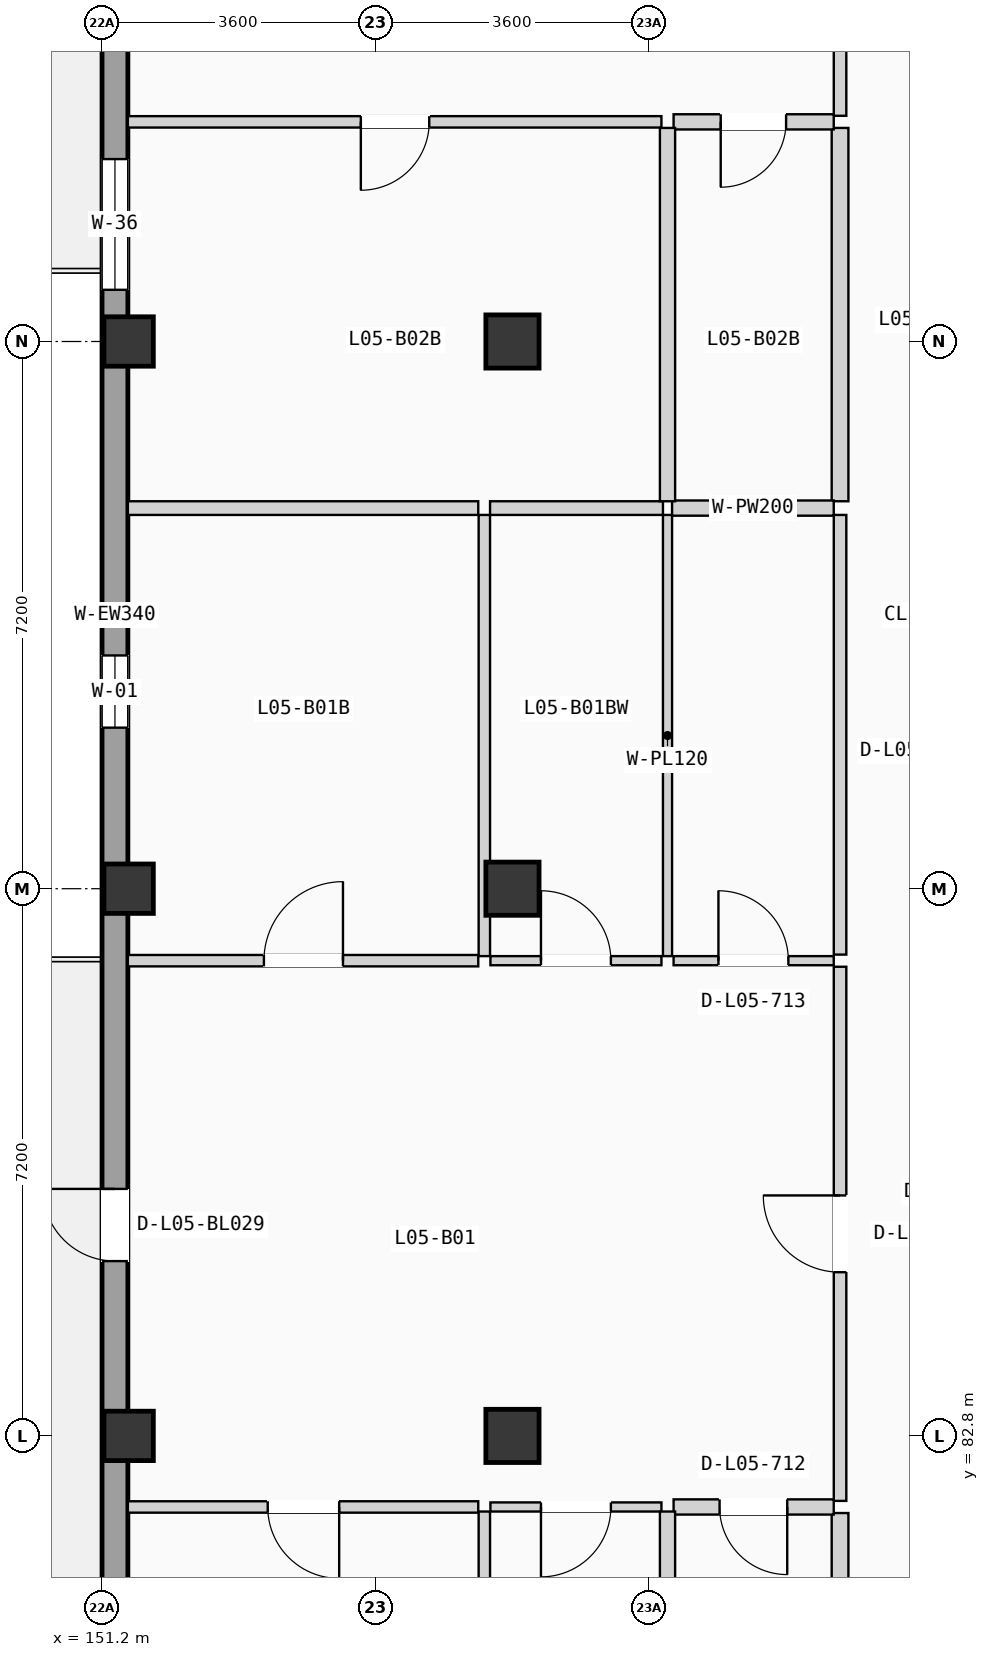
"""IFC4 building model, lengths in metres.
Left out: names, types, materials, properties, quantities, classifications, styles, units other than length and angle.
Written with IfcOpenShell. Run it as: python <this file> out.ifc"""

import sys

from ifc_helpers import new_model, si_unit, direction, frame, frame_2d, origin, origin_2d, place, context, subcontext, project, spatial, rectangle, extrude, element, fill, save


model = new_model("IFC4")
c1 = context("Model", 3, precision=1e-05, world=origin(), true_north=direction((0.0, 1.0)))
c2 = subcontext(c1, "Body", "Model", "MODEL_VIEW")
j1 = project(units=[si_unit("LENGTHUNIT", "METRE"), si_unit("PLANEANGLEUNIT", "RADIAN")], contexts=[c1])
p1 = place(None, origin())
s1 = spatial("IfcSite", under=j1, at=p1, CompositionType="ELEMENT")
p2 = place(p1, origin())
s2 = spatial("IfcBuilding", under=s1, at=p2, CompositionType="ELEMENT")
p3 = place(p2, frame((0.0, 0.0, 18.375)))
s3 = spatial("IfcBuildingStorey", under=s2, at=p3, CompositionType="ELEMENT", Elevation=18.375)
for number, where, z_axis, x_axis in (
    (1, (151.55, 82.8, 0.0), (0.0, 0.0, 1.0), (1.0, 0.0, 0.0)),
    (2, (151.55, 90.0, 0.0), (0.0, 0.0, 1.0), (1.0, 0.0, 0.0)),
    (3, (151.55, 97.2, 0.0), (0.0, 0.0, 1.0), (1.0, 0.0, 0.0)),
):
    element("IfcColumn", number, at=place(p3, frame(where, z_axis=z_axis, x_axis=x_axis)), inside=s3, PredefinedType="COLUMN", context=c2, shape_type="SweptSolid", body=[
        extrude(rectangle(XDim=0.65, YDim=0.65, at=origin_2d()), origin(), (0.0, 0.0, 1.0), 3.15),
    ])
for number, where, z_axis, x_axis in (
    (4, (156.6, 82.8, 0.0), (0.0, 0.0, 1.0), (1.0, 0.0, 0.0)),
    (5, (156.6, 90.0, 0.0), (0.0, 0.0, 1.0), (1.0, 0.0, 0.0)),
    (6, (156.6, 97.2, 0.0), (0.0, 0.0, 1.0), (1.0, 0.0, 0.0)),
):
    element("IfcColumn", number, at=place(p3, frame(where, z_axis=z_axis, x_axis=x_axis)), inside=s3, PredefinedType="COLUMN", context=c2, shape_type="SweptSolid", body=[
        extrude(rectangle(XDim=0.7, YDim=0.7, at=origin_2d()), origin(), (0.0, 0.0, 1.0), 3.15),
    ])
p4 = place(p3, frame((151.37, 68.74, 0.0), z_axis=(0.0, 0.0, 1.0), x_axis=(0.0, 1.0, 0.0)))
e7 = element("IfcWall", 7, at=p4, inside=s3, PredefinedType="SOLIDWALL", context=c2, shape_type="SweptSolid", body=[
    extrude(rectangle(XDim=49.72, YDim=0.34, at=frame_2d((24.86, 0.0))), origin(), (0.0, 0.0, 1.0), 2.89),
])
p5 = place(p4, frame((16.36, 0.0, 0.0)))
e8 = element("IfcOpeningElement", 8, at=p5, cuts=e7, PredefinedType="OPENING", context=c2, shape_type="SweptSolid", body=[
    extrude(rectangle(XDim=0.95, YDim=2.15, at=frame_2d((0.475, 1.075))), frame((0.0, 0.18, 0.0), z_axis=(0.0, -1.0, 0.0), x_axis=(1.0, 0.0, 0.0)), (0.0, 0.0, 1.0), 0.36),
])
p6 = place(p4, frame((9.353, 0.0, 0.555)))
e9 = element("IfcOpeningElement", 9, at=p6, cuts=e7, PredefinedType="OPENING", context=c2, shape_type="SweptSolid", body=[
    extrude(rectangle(XDim=1.6, YDim=1.65, at=frame_2d((0.8, 0.825))), frame((0.0, 0.18, 0.0), z_axis=(0.0, -1.0, 0.0), x_axis=(1.0, 0.0, 0.0)), (0.0, 0.0, 1.0), 0.36),
])
p7 = place(p4, frame((23.379, 0.0, 0.85)))
e10 = element("IfcOpeningElement", 10, at=p7, cuts=e7, PredefinedType="OPENING", context=c2, shape_type="SweptSolid", body=[
    extrude(rectangle(XDim=0.95, YDim=1.2, at=frame_2d((0.475, 0.6))), frame((0.0, 0.18, 0.0), z_axis=(0.0, -1.0, 0.0), x_axis=(1.0, 0.0, 0.0)), (0.0, 0.0, 1.0), 0.36),
])
p8 = place(p4, frame((32.455, 0.0, 0.0)))
e11 = element("IfcOpeningElement", 11, at=p8, cuts=e7, PredefinedType="OPENING", context=c2, shape_type="SweptSolid", body=[
    extrude(rectangle(XDim=1.08, YDim=2.18, at=frame_2d((0.54, 1.09))), frame((0.0, 0.18, 0.0), z_axis=(0.0, -1.0, 0.0), x_axis=(1.0, 0.0, 0.0)), (0.0, 0.0, 1.0), 0.36),
])
p9 = place(p4, frame((29.14, 0.0, 0.9)))
e12 = element("IfcOpeningElement", 12, at=p9, cuts=e7, PredefinedType="OPENING", context=c2, shape_type="SweptSolid", body=[
    extrude(rectangle(XDim=1.72, YDim=1.2, at=frame_2d((0.86, 0.6))), frame((0.0, 0.18, 0.0), z_axis=(0.0, -1.0, 0.0), x_axis=(1.0, 0.0, 0.0)), (0.0, 0.0, 1.0), 0.36),
])
p10 = place(p4, frame((39.144, 0.0, 0.855)))
e13 = element("IfcOpeningElement", 13, at=p10, cuts=e7, PredefinedType="OPENING", context=c2, shape_type="SweptSolid", body=[
    extrude(rectangle(XDim=1.72, YDim=1.35, at=frame_2d((0.86, 0.675))), frame((0.0, 0.18, 0.0), z_axis=(0.0, -1.0, 0.0), x_axis=(1.0, 0.0, 0.0)), (0.0, 0.0, 1.0), 0.36),
])
p11 = place(p3, frame((160.91, 81.945, 0.0), z_axis=(0.0, 0.0, 1.0), x_axis=(0.0, 1.0, 0.0)))
e14 = element("IfcWall", 14, at=p11, inside=s3, PredefinedType="PARTITIONING", context=c2, shape_type="SweptSolid", body=[
    extrude(rectangle(XDim=7.028, YDim=0.165, at=frame_2d((3.514, 0.0))), origin(), (0.0, 0.0, 1.0), 2.87),
])
p12 = place(p11, frame((3.009, 0.0, 0.0)))
e15 = element("IfcOpeningElement", 15, at=p12, cuts=e14, PredefinedType="OPENING", context=c2, shape_type="SweptSolid", body=[
    extrude(rectangle(XDim=1.01, YDim=2.11, at=frame_2d((0.505, 1.055))), frame((0.0, 0.093, 0.0), z_axis=(0.0, -1.0, 0.0), x_axis=(1.0, 0.0, 0.0)), (0.0, 0.0, 1.0), 0.185),
])
p13 = place(p3, frame((160.91, 76.0, 0.0), z_axis=(0.0, 0.0, 1.0), x_axis=(0.0, 1.0, 0.0)))
e16 = element("IfcWall", 16, at=p13, inside=s3, PredefinedType="PLUMBINGWALL", context=c2, shape_type="SweptSolid", body=[
    extrude(rectangle(XDim=5.785, YDim=0.22, at=frame_2d((2.893, 0.0))), origin(), (0.0, 0.0, 1.0), 2.87),
])
p14 = place(p3, frame((160.91, 89.133, 0.0), z_axis=(0.0, 0.0, 1.0), x_axis=(0.0, 1.0, 0.0)))
e17 = element("IfcWall", 17, at=p14, inside=s3, PredefinedType="PARTITIONING", context=c2, shape_type="SweptSolid", body=[
    extrude(rectangle(XDim=5.785, YDim=0.165, at=frame_2d((2.893, 0.0))), origin(), (0.0, 0.0, 1.0), 2.87),
])
p15 = place(p3, frame((160.91, 100.17, 0.0), z_axis=(0.0, 0.0, 1.0), x_axis=(0.0, 1.0, 0.0)))
e18 = element("IfcWall", 18, at=p15, inside=s3, PredefinedType="PARTITIONING", context=c2, shape_type="SweptSolid", body=[
    extrude(rectangle(XDim=5.958, YDim=0.165, at=frame_2d((2.979, 0.0))), origin(), (0.0, 0.0, 1.0), 2.87),
])
p16 = place(p15, frame((2.474, 0.0, 0.0)))
e19 = element("IfcOpeningElement", 19, at=p16, cuts=e18, PredefinedType="OPENING", context=c2, shape_type="SweptSolid", body=[
    extrude(rectangle(XDim=1.01, YDim=2.11, at=frame_2d((0.505, 1.055))), frame((0.0, 0.093, 0.0), z_axis=(0.0, -1.0, 0.0), x_axis=(1.0, 0.0, 0.0)), (0.0, 0.0, 1.0), 0.185),
])
p17 = place(p3, frame((160.91, 95.098, 0.0), z_axis=(0.0, 0.0, 1.0), x_axis=(0.0, 1.0, 0.0)))
e20 = element("IfcWall", 20, at=p17, inside=s3, PredefinedType="PLUMBINGWALL", context=c2, shape_type="SweptSolid", body=[
    extrude(rectangle(XDim=4.912, YDim=0.22, at=frame_2d((2.456, 0.0))), origin(), (0.0, 0.0, 1.0), 2.87),
])
p18 = place(p3, frame((158.72, 81.865, 0.0), z_axis=(0.0, 0.0, 1.0), x_axis=(1.0, 0.0, 0.0)))
e21 = element("IfcWall", 21, at=p18, inside=s3, PredefinedType="PLUMBINGWALL", context=c2, shape_type="SweptSolid", body=[
    extrude(rectangle(XDim=2.107, YDim=0.2, at=frame_2d((1.053, 0.0))), origin(), (0.0, 0.0, 1.0), 2.87),
])
p19 = place(p18, frame((0.605, 0.0, 0.0)))
e22 = element("IfcOpeningElement", 22, at=p19, cuts=e21, PredefinedType="OPENING", context=c2, shape_type="SweptSolid", body=[
    extrude(rectangle(XDim=0.89, YDim=2.03, at=frame_2d((0.445, 1.015))), frame((0.0, 0.11, 0.0), z_axis=(0.0, -1.0, 0.0), x_axis=(1.0, 0.0, 0.0)), (0.0, 0.0, 1.0), 0.22),
])
p20 = place(p3, frame((158.72, 89.053, 0.0), z_axis=(0.0, 0.0, 1.0), x_axis=(1.0, 0.0, 0.0)))
e23 = element("IfcWall", 23, at=p20, inside=s3, PredefinedType="PARTITIONING", context=c2, shape_type="SweptSolid", body=[
    extrude(rectangle(XDim=2.107, YDim=0.12, at=frame_2d((1.053, 0.0))), origin(), (0.0, 0.0, 1.0), 2.87),
])
p21 = place(p20, frame((0.59, 0.0, 0.0)))
e24 = element("IfcOpeningElement", 24, at=p21, cuts=e23, PredefinedType="OPENING", context=c2, shape_type="SweptSolid", body=[
    extrude(rectangle(XDim=0.92, YDim=2.02, at=frame_2d((0.46, 1.01))), frame((0.0, 0.07, 0.0), z_axis=(0.0, -1.0, 0.0), x_axis=(1.0, 0.0, 0.0)), (0.0, 0.0, 1.0), 0.14),
])
p22 = place(p3, frame((151.54, 81.865, 0.0), z_axis=(0.0, 0.0, 1.0), x_axis=(1.0, 0.0, 0.0)))
e25 = element("IfcWall", 25, at=p22, inside=s3, PredefinedType="PARTITIONING", context=c2, shape_type="SweptSolid", body=[
    extrude(rectangle(XDim=4.61, YDim=0.15, at=frame_2d((2.305, 0.0))), origin(), (0.0, 0.0, 1.0), 2.87),
])
p23 = place(p22, frame((1.84, 0.0, 0.0)))
e26 = element("IfcOpeningElement", 26, at=p23, cuts=e25, PredefinedType="OPENING", context=c2, shape_type="SweptSolid", body=[
    extrude(rectangle(XDim=0.94, YDim=2.06, at=frame_2d((0.47, 1.03))), frame((0.0, 0.085, 0.0), z_axis=(0.0, -1.0, 0.0), x_axis=(1.0, 0.0, 0.0)), (0.0, 0.0, 1.0), 0.17),
])
p24 = place(p3, frame((156.31, 81.865, 0.0), z_axis=(0.0, 0.0, 1.0), x_axis=(1.0, 0.0, 0.0)))
e27 = element("IfcWall", 27, at=p24, inside=s3, PredefinedType="PARTITIONING", context=c2, shape_type="SweptSolid", body=[
    extrude(rectangle(XDim=2.25, YDim=0.12, at=frame_2d((1.125, 0.0))), origin(), (0.0, 0.0, 1.0), 2.87),
])
p25 = place(p24, frame((0.665, 0.0, 0.0)))
e28 = element("IfcOpeningElement", 28, at=p25, cuts=e27, PredefinedType="OPENING", context=c2, shape_type="SweptSolid", body=[
    extrude(rectangle(XDim=0.92, YDim=2.02, at=frame_2d((0.46, 1.01))), frame((0.0, 0.07, 0.0), z_axis=(0.0, -1.0, 0.0), x_axis=(1.0, 0.0, 0.0)), (0.0, 0.0, 1.0), 0.14),
])
p26 = place(p3, frame((151.54, 89.053, 0.0), z_axis=(0.0, 0.0, 1.0), x_axis=(1.0, 0.0, 0.0)))
e29 = element("IfcWall", 29, at=p26, inside=s3, PredefinedType="PARTITIONING", context=c2, shape_type="SweptSolid", body=[
    extrude(rectangle(XDim=4.61, YDim=0.15, at=frame_2d((2.305, 0.0))), origin(), (0.0, 0.0, 1.0), 2.87),
])
p27 = place(p26, frame((1.79, 0.0, 0.0)))
e30 = element("IfcOpeningElement", 30, at=p27, cuts=e29, PredefinedType="OPENING", context=c2, shape_type="SweptSolid", body=[
    extrude(rectangle(XDim=1.04, YDim=2.08, at=frame_2d((0.52, 1.04))), frame((0.0, 0.085, 0.0), z_axis=(0.0, -1.0, 0.0), x_axis=(1.0, 0.0, 0.0)), (0.0, 0.0, 1.0), 0.17),
])
p28 = place(p3, frame((156.31, 89.053, 0.0), z_axis=(0.0, 0.0, 1.0), x_axis=(1.0, 0.0, 0.0)))
e31 = element("IfcWall", 31, at=p28, inside=s3, PredefinedType="PARTITIONING", context=c2, shape_type="SweptSolid", body=[
    extrude(rectangle(XDim=2.25, YDim=0.12, at=frame_2d((1.125, 0.0))), origin(), (0.0, 0.0, 1.0), 2.87),
])
p29 = place(p28, frame((0.665, 0.0, 0.0)))
e32 = element("IfcOpeningElement", 32, at=p29, cuts=e31, PredefinedType="OPENING", context=c2, shape_type="SweptSolid", body=[
    extrude(rectangle(XDim=0.92, YDim=2.02, at=frame_2d((0.46, 1.01))), frame((0.0, 0.07, 0.0), z_axis=(0.0, -1.0, 0.0), x_axis=(1.0, 0.0, 0.0)), (0.0, 0.0, 1.0), 0.14),
])
p30 = place(p3, frame((158.64, 76.0, 0.0), z_axis=(0.0, 0.0, 1.0), x_axis=(0.0, 1.0, 0.0)))
e33 = element("IfcWall", 33, at=p30, inside=s3, PredefinedType="PLUMBINGWALL", context=c2, shape_type="SweptSolid", body=[
    extrude(rectangle(XDim=5.805, YDim=0.2, at=frame_2d((2.902, 0.0))), origin(), (0.0, 0.0, 1.0), 2.87),
])
p31 = place(p30, frame((2.467, 0.0, 0.0)))
e34 = element("IfcOpeningElement", 34, at=p31, cuts=e33, PredefinedType="OPENING", context=c2, shape_type="SweptSolid", body=[
    extrude(rectangle(XDim=0.85, YDim=2.01, at=frame_2d((0.425, 1.005))), frame((0.0, 0.11, 0.0), z_axis=(0.0, -1.0, 0.0), x_axis=(1.0, 0.0, 0.0)), (0.0, 0.0, 1.0), 0.22),
])
p32 = place(p3, frame((158.64, 89.113, 0.0), z_axis=(0.0, 0.0, 1.0), x_axis=(0.0, 1.0, 0.0)))
e35 = element("IfcWall", 35, at=p32, inside=s3, PredefinedType="PARTITIONING", context=c2, shape_type="SweptSolid", body=[
    extrude(rectangle(XDim=5.805, YDim=0.12, at=frame_2d((2.902, 0.0))), origin(), (0.0, 0.0, 1.0), 2.87),
])
p33 = place(p3, frame((158.7, 95.008, 0.0), z_axis=(0.0, 0.0, 1.0), x_axis=(1.0, 0.0, 0.0)))
e36 = element("IfcWall", 36, at=p33, inside=s3, PredefinedType="PLUMBINGWALL", context=c2, shape_type="SweptSolid", body=[
    extrude(rectangle(XDim=2.127, YDim=0.2, at=frame_2d((1.063, 0.0))), origin(), (0.0, 0.0, 1.0), 2.87),
])
for number, where, z_axis, x_axis in (
    (37, (156.23, 76.0, 0.0), (0.0, 0.0, 1.0), (0.0, 1.0, 0.0)),
    (38, (156.23, 89.113, 0.0), (0.0, 0.0, 1.0), (0.0, 1.0, 0.0)),
):
    element("IfcWall", number, at=place(p3, frame(where, z_axis=z_axis, x_axis=x_axis)), inside=s3, PredefinedType="PARTITIONING", context=c2, shape_type="SweptSolid", body=[
        extrude(rectangle(XDim=5.805, YDim=0.15, at=frame_2d((2.902, 0.0))), origin(), (0.0, 0.0, 1.0), 2.87),
    ])
p34 = place(p3, frame((151.54, 95.008, 0.0), z_axis=(0.0, 0.0, 1.0), x_axis=(1.0, 0.0, 0.0)))
e39 = element("IfcWall", 39, at=p34, inside=s3, PredefinedType="PARTITIONING", context=c2, shape_type="SweptSolid", body=[
    extrude(rectangle(XDim=4.61, YDim=0.18, at=frame_2d((2.305, 0.0))), origin(), (0.0, 0.0, 1.0), 2.87),
])
p35 = place(p3, frame((156.305, 95.008, 0.0), z_axis=(0.0, 0.0, 1.0), x_axis=(1.0, 0.0, 0.0)))
e40 = element("IfcWall", 40, at=p35, inside=s3, PredefinedType="PARTITIONING", context=c2, shape_type="SweptSolid", body=[
    extrude(rectangle(XDim=2.275, YDim=0.18, at=frame_2d((1.138, 0.0))), origin(), (0.0, 0.0, 1.0), 2.87),
])
p36 = place(p3, frame((158.72, 100.09, 0.0), z_axis=(0.0, 0.0, 1.0), x_axis=(1.0, 0.0, 0.0)))
e41 = element("IfcWall", 41, at=p36, inside=s3, PredefinedType="PLUMBINGWALL", context=c2, shape_type="SweptSolid", body=[
    extrude(rectangle(XDim=2.107, YDim=0.2, at=frame_2d((1.053, 0.0))), origin(), (0.0, 0.0, 1.0), 2.87),
])
p37 = place(p36, frame((0.62, 0.0, 0.0)))
e42 = element("IfcOpeningElement", 42, at=p37, cuts=e41, PredefinedType="OPENING", context=c2, shape_type="SweptSolid", body=[
    extrude(rectangle(XDim=0.86, YDim=2.0, at=frame_2d((0.43, 1.0))), frame((0.0, 0.11, 0.0), z_axis=(0.0, -1.0, 0.0), x_axis=(1.0, 0.0, 0.0)), (0.0, 0.0, 1.0), 0.22),
])
p38 = place(p3, frame((151.54, 100.09, 0.0), z_axis=(0.0, 0.0, 1.0), x_axis=(1.0, 0.0, 0.0)))
e43 = element("IfcWall", 43, at=p38, inside=s3, PredefinedType="PARTITIONING", context=c2, shape_type="SweptSolid", body=[
    extrude(rectangle(XDim=7.02, YDim=0.15, at=frame_2d((3.51, 0.0))), origin(), (0.0, 0.0, 1.0), 2.87),
])
p39 = place(p38, frame((3.065, 0.0, 0.0)))
e44 = element("IfcOpeningElement", 44, at=p39, cuts=e43, PredefinedType="OPENING", context=c2, shape_type="SweptSolid", body=[
    extrude(rectangle(XDim=0.9, YDim=2.04, at=frame_2d((0.45, 1.02))), frame((0.0, 0.085, 0.0), z_axis=(0.0, -1.0, 0.0), x_axis=(1.0, 0.0, 0.0)), (0.0, 0.0, 1.0), 0.17),
])
p40 = place(p3, frame((158.64, 95.098, 0.0), z_axis=(0.0, 0.0, 1.0), x_axis=(0.0, 1.0, 0.0)))
e45 = element("IfcWall", 45, at=p40, inside=s3, PredefinedType="PLUMBINGWALL", context=c2, shape_type="SweptSolid", body=[
    extrude(rectangle(XDim=4.912, YDim=0.2, at=frame_2d((2.456, 0.0))), origin(), (0.0, 0.0, 1.0), 2.87),
])
p41 = place(p5, origin())
e46 = element("IfcDoor", 46, at=p41, inside=s3, OperationType="SINGLE_SWING_RIGHT", PredefinedType="DOOR", context=c2, shape_type="SweptSolid", body=[
    extrude(rectangle(XDim=0.95, YDim=2.15, at=frame_2d((0.475, 1.075))), frame((0.0, 0.025, 0.0), z_axis=(0.0, -1.0, 0.0), x_axis=(1.0, 0.0, 0.0)), (0.0, 0.0, 1.0), 0.05),
])
fill(e8, e46)
p42 = place(p7, origin())
e47 = element("IfcWindow", 47, at=p42, inside=s3, PartitioningType="SINGLE_PANEL", PredefinedType="WINDOW", context=c2, shape_type="SweptSolid", body=[
    extrude(rectangle(XDim=0.95, YDim=1.2, at=frame_2d((0.475, 0.6))), frame((0.0, 0.03, 0.0), z_axis=(0.0, -1.0, 0.0), x_axis=(1.0, 0.0, 0.0)), (0.0, 0.0, 1.0), 0.06),
])
fill(e10, e47)
p43 = place(p9, origin())
e48 = element("IfcWindow", 48, at=p43, inside=s3, PartitioningType="DOUBLE_PANEL_VERTICAL", PredefinedType="WINDOW", context=c2, shape_type="SweptSolid", body=[
    extrude(rectangle(XDim=1.72, YDim=1.2, at=frame_2d((0.86, 0.6))), frame((0.0, 0.03, 0.0), z_axis=(0.0, -1.0, 0.0), x_axis=(1.0, 0.0, 0.0)), (0.0, 0.0, 1.0), 0.06),
])
fill(e12, e48)
p44 = place(p12, origin())
e49 = element("IfcDoor", 49, at=p44, inside=s3, OperationType="SINGLE_SWING_RIGHT", PredefinedType="DOOR", context=c2, shape_type="SweptSolid", body=[
    extrude(rectangle(XDim=1.01, YDim=2.11, at=frame_2d((0.505, 1.055))), frame((0.0, 0.025, 0.0), z_axis=(0.0, -1.0, 0.0), x_axis=(1.0, 0.0, 0.0)), (0.0, 0.0, 1.0), 0.05),
])
fill(e15, e49)
p45 = place(p19, frame((0.89, 0.0, 0.0), z_axis=(0.0, 0.0, 1.0), x_axis=(-1.0, 0.0, 0.0)))
e50 = element("IfcDoor", 50, at=p45, inside=s3, OperationType="SINGLE_SWING_RIGHT", PredefinedType="DOOR", context=c2, shape_type="SweptSolid", body=[
    extrude(rectangle(XDim=0.89, YDim=2.03, at=frame_2d((0.445, 1.015))), frame((0.0, 0.025, 0.0), z_axis=(0.0, -1.0, 0.0), x_axis=(1.0, 0.0, 0.0)), (0.0, 0.0, 1.0), 0.05),
])
fill(e22, e50)
p46 = place(p21, origin())
e51 = element("IfcDoor", 51, at=p46, inside=s3, OperationType="SINGLE_SWING_LEFT", PredefinedType="DOOR", context=c2, shape_type="SweptSolid", body=[
    extrude(rectangle(XDim=0.92, YDim=2.02, at=frame_2d((0.46, 1.01))), frame((0.0, 0.025, 0.0), z_axis=(0.0, -1.0, 0.0), x_axis=(1.0, 0.0, 0.0)), (0.0, 0.0, 1.0), 0.05),
])
fill(e24, e51)
p47 = place(p23, frame((0.94, 0.0, 0.0), z_axis=(0.0, 0.0, 1.0), x_axis=(-1.0, 0.0, 0.0)))
e52 = element("IfcDoor", 52, at=p47, inside=s3, OperationType="SINGLE_SWING_RIGHT", PredefinedType="DOOR", context=c2, shape_type="SweptSolid", body=[
    extrude(rectangle(XDim=0.94, YDim=2.06, at=frame_2d((0.47, 1.03))), frame((0.0, 0.025, 0.0), z_axis=(0.0, -1.0, 0.0), x_axis=(1.0, 0.0, 0.0)), (0.0, 0.0, 1.0), 0.05),
])
fill(e26, e52)
p48 = place(p25, frame((0.92, 0.0, 0.0), z_axis=(0.0, 0.0, 1.0), x_axis=(-1.0, 0.0, 0.0)))
e53 = element("IfcDoor", 53, at=p48, inside=s3, OperationType="SINGLE_SWING_LEFT", PredefinedType="DOOR", context=c2, shape_type="SweptSolid", body=[
    extrude(rectangle(XDim=0.92, YDim=2.02, at=frame_2d((0.46, 1.01))), frame((0.0, 0.025, 0.0), z_axis=(0.0, -1.0, 0.0), x_axis=(1.0, 0.0, 0.0)), (0.0, 0.0, 1.0), 0.05),
])
fill(e28, e53)
p49 = place(p27, origin())
e54 = element("IfcDoor", 54, at=p49, inside=s3, OperationType="SINGLE_SWING_RIGHT", PredefinedType="DOOR", context=c2, shape_type="SweptSolid", body=[
    extrude(rectangle(XDim=1.04, YDim=2.08, at=frame_2d((0.52, 1.04))), frame((0.0, 0.025, 0.0), z_axis=(0.0, -1.0, 0.0), x_axis=(1.0, 0.0, 0.0)), (0.0, 0.0, 1.0), 0.05),
])
fill(e30, e54)
p50 = place(p29, origin())
e55 = element("IfcDoor", 55, at=p50, inside=s3, OperationType="SINGLE_SWING_LEFT", PredefinedType="DOOR", context=c2, shape_type="SweptSolid", body=[
    extrude(rectangle(XDim=0.92, YDim=2.02, at=frame_2d((0.46, 1.01))), frame((0.0, 0.025, 0.0), z_axis=(0.0, -1.0, 0.0), x_axis=(1.0, 0.0, 0.0)), (0.0, 0.0, 1.0), 0.05),
])
fill(e32, e55)
p51 = place(p37, frame((0.86, 0.0, 0.0), z_axis=(0.0, 0.0, 1.0), x_axis=(-1.0, 0.0, 0.0)))
e56 = element("IfcDoor", 56, at=p51, inside=s3, OperationType="SINGLE_SWING_LEFT", PredefinedType="DOOR", context=c2, shape_type="SweptSolid", body=[
    extrude(rectangle(XDim=0.86, YDim=2.0, at=frame_2d((0.43, 1.0))), frame((0.0, 0.025, 0.0), z_axis=(0.0, -1.0, 0.0), x_axis=(1.0, 0.0, 0.0)), (0.0, 0.0, 1.0), 0.05),
])
fill(e42, e56)
p52 = place(p39, frame((0.9, 0.0, 0.0), z_axis=(0.0, 0.0, 1.0), x_axis=(-1.0, 0.0, 0.0)))
e57 = element("IfcDoor", 57, at=p52, inside=s3, OperationType="SINGLE_SWING_LEFT", PredefinedType="DOOR", context=c2, shape_type="SweptSolid", body=[
    extrude(rectangle(XDim=0.9, YDim=2.04, at=frame_2d((0.45, 1.02))), frame((0.0, 0.025, 0.0), z_axis=(0.0, -1.0, 0.0), x_axis=(1.0, 0.0, 0.0)), (0.0, 0.0, 1.0), 0.05),
])
fill(e44, e57)
save(model, sys.argv[1])
